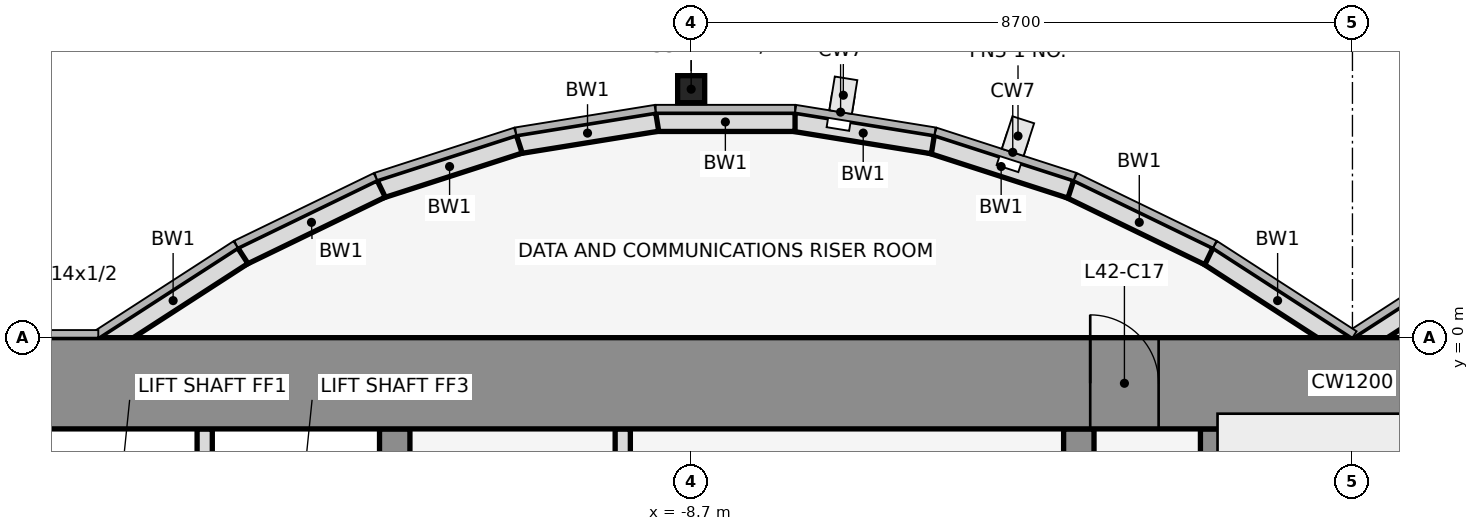
"""IFC4 building model, lengths in metres.
Left out: names, types, materials, properties, quantities, classifications, styles, units other than length and angle.
Written with IfcOpenShell. Run it as: python <this file> out.ifc"""

import sys

from ifc_helpers import new_model, si_unit, direction, frame, frame_2d, origin, origin_2d, place, context, subcontext, project, spatial, rectangle, hollow_rectangle, extrude, element, fill, save


model = new_model("IFC4")
c1 = context("Model", 3, precision=1e-05, world=origin(), true_north=direction((0.0, 1.0)))
c2 = subcontext(c1, "Body", "Model", "MODEL_VIEW")
j1 = project(units=[si_unit("LENGTHUNIT", "METRE"), si_unit("PLANEANGLEUNIT", "RADIAN")], contexts=[c1])
p1 = place(None, origin())
s1 = spatial("IfcSite", under=j1, at=p1, CompositionType="ELEMENT")
p2 = place(p1, origin())
s2 = spatial("IfcBuilding", under=s1, at=p2, CompositionType="ELEMENT")
p3 = place(p2, frame((0.0, 0.0, 190.9)))
s3 = spatial("IfcBuildingStorey", under=s2, at=p3, CompositionType="ELEMENT", Elevation=190.9)
p4 = place(p3, frame((-8.7, 3.269, 0.0), z_axis=(0.0, 0.0, 1.0), x_axis=(1.0, 0.0, 0.0)))
e1 = element("IfcColumn", 1, at=p4, inside=s3, PredefinedType="COLUMN", context=c2, shape_type="SweptSolid", body=[
    extrude(hollow_rectangle(XDim=0.356, YDim=0.356, WallThickness=0.012, at=origin_2d()), origin(), (0.0, 0.0, 1.0), 4.1),
])
for number, where, z_axis, x_axis in (
    (2, (1.901, 1.08, 0.0), (0.0, 0.0, 1.0), (-0.84, -0.543, 0.0)),
    (3, (-0.068, -0.105, 0.0), (0.0, 0.0, 1.0), (-0.84, 0.543, 0.0)),
):
    element("IfcWall", number, at=place(p3, frame(where, z_axis=z_axis, x_axis=x_axis)), inside=s3, PredefinedType="STANDARD", context=c2, shape_type="SweptSolid", body=[
        extrude(rectangle(XDim=2.183, YDim=0.25, at=frame_2d((1.091, 0.0))), origin(), (0.0, 0.0, 1.0), 3.95),
    ])
p5 = place(p3, frame((-1.888, 1.073, 0.0), z_axis=(0.0, 0.0, 1.0), x_axis=(-0.89982408427, 0.436252928206, 0.0)))
e4 = element("IfcWall", 4, at=p5, inside=s3, PredefinedType="STANDARD", context=c2, shape_type="SweptSolid", body=[
    extrude(rectangle(XDim=2.038, YDim=0.25, at=frame_2d((1.019, 0.0))), origin(), (0.0, 0.0, 1.0), 3.95),
])
p6 = place(p3, frame((-3.705, 1.955, 0.0), z_axis=(0.0, 0.0, 1.0), x_axis=(-0.951495806175, 0.307661714928, 0.0)))
e5 = element("IfcWall", 5, at=p6, inside=s3, PredefinedType="STANDARD", context=c2, shape_type="SweptSolid", body=[
    extrude(rectangle(XDim=1.927, YDim=0.25, at=frame_2d((0.963, 0.0))), origin(), (0.0, 0.0, 1.0), 3.95),
])
p7 = place(p3, frame((-5.52, 2.543, 0.0), z_axis=(0.0, 0.0, 1.0), x_axis=(-0.987181718931, 0.159600293885, 0.0)))
e6 = element("IfcWall", 6, at=p7, inside=s3, PredefinedType="STANDARD", context=c2, shape_type="SweptSolid", body=[
    extrude(rectangle(XDim=1.857, YDim=0.25, at=frame_2d((0.929, 0.0))), origin(), (0.0, 0.0, 1.0), 3.95),
])
p8 = place(p3, frame((-7.333, 2.838, 0.0), z_axis=(0.0, 0.0, 1.0), x_axis=(-1.0, 0.0, 0.0)))
e7 = element("IfcWall", 7, at=p8, inside=s3, PredefinedType="STANDARD", context=c2, shape_type="SweptSolid", body=[
    extrude(rectangle(XDim=1.833, YDim=0.25, at=frame_2d((0.917, 0.0))), origin(), (0.0, 0.0, 1.0), 3.95),
])
p9 = place(p3, frame((-9.147, 2.84, 0.0), z_axis=(0.0, 0.0, 1.0), x_axis=(-0.987181718931, -0.159600293885, 0.0)))
e8 = element("IfcWall", 8, at=p9, inside=s3, PredefinedType="STANDARD", context=c2, shape_type="SweptSolid", body=[
    extrude(rectangle(XDim=1.857, YDim=0.25, at=frame_2d((0.929, 0.0))), origin(), (0.0, 0.0, 1.0), 3.95),
])
p10 = place(p3, frame((-10.962, 2.548, 0.0), z_axis=(0.0, 0.0, 1.0), x_axis=(-0.951495806175, -0.307661714928, 0.0)))
e9 = element("IfcWall", 9, at=p10, inside=s3, PredefinedType="STANDARD", context=c2, shape_type="SweptSolid", body=[
    extrude(rectangle(XDim=1.927, YDim=0.25, at=frame_2d((0.963, 0.0))), origin(), (0.0, 0.0, 1.0), 3.95),
])
p11 = place(p3, frame((-12.779, 1.962, 0.0), z_axis=(0.0, 0.0, 1.0), x_axis=(-0.89982408427, -0.436252928206, 0.0)))
e10 = element("IfcWall", 10, at=p11, inside=s3, PredefinedType="STANDARD", context=c2, shape_type="SweptSolid", body=[
    extrude(rectangle(XDim=2.038, YDim=0.25, at=frame_2d((1.019, 0.0))), origin(), (0.0, 0.0, 1.0), 3.95),
])
p12 = place(p3, frame((-14.599, 1.08, 0.0), z_axis=(0.0, 0.0, 1.0), x_axis=(-0.83981312244, -0.542875602121, 0.0)))
e11 = element("IfcWall", 11, at=p12, inside=s3, PredefinedType="STANDARD", context=c2, shape_type="SweptSolid", body=[
    extrude(rectangle(XDim=2.183, YDim=0.25, at=frame_2d((1.091, 0.0))), origin(), (0.0, 0.0, 1.0), 3.95),
])
p13 = place(p3, frame((-15.1, -4.6, 0.0), z_axis=(0.0, 0.0, 1.0), x_axis=(0.0, 1.0, 0.0)))
e12 = element("IfcWall", 12, at=p13, inside=s3, PredefinedType="PARTITIONING", context=c2, shape_type="SweptSolid", body=[
    extrude(rectangle(XDim=3.4, YDim=0.2, at=frame_2d((1.7, 0.0))), origin(), (0.0, 0.0, 1.0), 2.96),
])
p14 = place(p3, frame((-12.6, -11.8, 0.0), z_axis=(0.0, 0.0, 1.0), x_axis=(0.0, 1.0, 0.0)))
e13 = element("IfcWall", 13, at=p14, inside=s3, PredefinedType="SHEAR", context=c2, shape_type="SweptSolid", body=[
    extrude(rectangle(XDim=10.6, YDim=0.4, at=frame_2d((5.3, 0.0))), origin(), (0.0, 0.0, 1.0), 4.1),
])
p15 = place(p14, frame((4.75, 0.0, 0.0)))
e14 = element("IfcOpeningElement", 14, at=p15, cuts=e13, PredefinedType="OPENING", context=c2, shape_type="SweptSolid", body=[
    extrude(rectangle(XDim=1.1, YDim=2.1, at=frame_2d((0.55, 1.05))), frame((0.0, 0.212, 0.0), z_axis=(0.0, -1.0, 0.0), x_axis=(1.0, 0.0, 0.0)), (0.0, 0.0, 1.0), 0.424),
])
p16 = place(p3, frame((-9.6, -4.6, 0.0), z_axis=(0.0, 0.0, 1.0), x_axis=(0.0, 1.0, 0.0)))
e15 = element("IfcWall", 15, at=p16, inside=s3, PredefinedType="PARTITIONING", context=c2, shape_type="SweptSolid", body=[
    extrude(rectangle(XDim=3.4, YDim=0.2, at=frame_2d((1.7, 0.0))), origin(), (0.0, 0.0, 1.0), 2.96),
])
p17 = place(p3, frame((-3.6, -11.8, 0.0), z_axis=(0.0, 0.0, 1.0), x_axis=(0.0, 1.0, 0.0)))
e16 = element("IfcWall", 16, at=p17, inside=s3, PredefinedType="SHEAR", context=c2, shape_type="SweptSolid", body=[
    extrude(rectangle(XDim=10.6, YDim=0.4, at=frame_2d((5.3, 0.0))), origin(), (0.0, 0.0, 1.0), 4.1),
])
p18 = place(p17, frame((4.85, 0.0, 0.0)))
e17 = element("IfcOpeningElement", 17, at=p18, cuts=e16, PredefinedType="OPENING", context=c2, shape_type="SweptSolid", body=[
    extrude(rectangle(XDim=0.9, YDim=2.1, at=frame_2d((0.45, 1.05))), frame((0.0, 0.212, 0.0), z_axis=(0.0, -1.0, 0.0), x_axis=(1.0, 0.0, 0.0)), (0.0, 0.0, 1.0), 0.424),
])
p19 = place(p3, frame((-1.8, -11.8, 0.0), z_axis=(0.0, 0.0, 1.0), x_axis=(0.0, 1.0, 0.0)))
e18 = element("IfcWall", 18, at=p19, inside=s3, PredefinedType="SHEAR", context=c2, shape_type="SweptSolid", body=[
    extrude(rectangle(XDim=10.6, YDim=0.4, at=frame_2d((5.3, 0.0))), origin(), (0.0, 0.0, 1.0), 4.1),
])
p20 = place(p3, frame((-22.0, -0.6, 0.0), z_axis=(0.0, 0.0, 1.0), x_axis=(1.0, 0.0, 0.0)))
e19 = element("IfcWall", 19, at=p20, inside=s3, PredefinedType="SHEAR", context=c2, shape_type="SweptSolid", body=[
    extrude(rectangle(XDim=44.0, YDim=1.2, at=frame_2d((22.0, 0.0))), origin(), (0.0, 0.0, 1.0), 4.1),
])
p21 = place(p20, frame((18.55, 0.0, 0.0)))
e20 = element("IfcOpeningElement", 20, at=p21, cuts=e19, PredefinedType="OPENING", context=c2, shape_type="SweptSolid", body=[
    extrude(rectangle(XDim=0.9, YDim=2.1, at=frame_2d((0.45, 1.05))), frame((0.0, 0.612, 0.0), z_axis=(0.0, -1.0, 0.0), x_axis=(1.0, 0.0, 0.0)), (0.0, 0.0, 1.0), 1.224),
])
p22 = place(p20, frame((24.55, 0.0, 0.0)))
e21 = element("IfcOpeningElement", 21, at=p22, cuts=e19, PredefinedType="OPENING", context=c2, shape_type="SweptSolid", body=[
    extrude(rectangle(XDim=0.9, YDim=2.1, at=frame_2d((0.45, 1.05))), frame((0.0, 0.612, 0.0), z_axis=(0.0, -1.0, 0.0), x_axis=(1.0, 0.0, 0.0)), (0.0, 0.0, 1.0), 1.224),
])
p23 = place(p21, origin())
e22 = element("IfcDoor", 22, at=p23, inside=s3, OperationType="SINGLE_SWING_LEFT", PredefinedType="DOOR", context=c2, shape_type="SweptSolid", body=[
    extrude(rectangle(XDim=0.9, YDim=2.1, at=frame_2d((0.45, 1.05))), frame((0.0, 0.025, 0.0), z_axis=(0.0, -1.0, 0.0), x_axis=(1.0, 0.0, 0.0)), (0.0, 0.0, 1.0), 0.05),
])
fill(e20, e22)
save(model, sys.argv[1])
